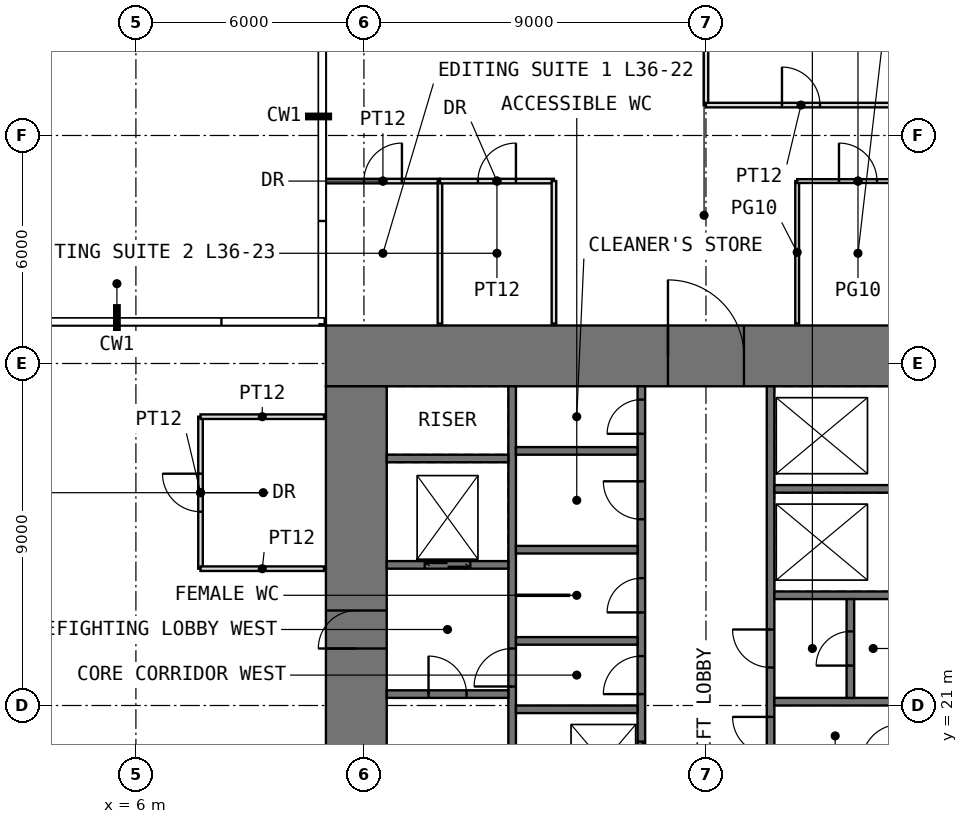
"""IFC4 building model, lengths in metres.
Left out: names, types, materials, properties, quantities, classifications, styles, units other than length and angle.
Written with IfcOpenShell. Run it as: python <this file> out.ifc"""

import sys

from ifc_helpers import new_model, si_unit, direction, frame, frame_2d, origin, place, context, subcontext, project, spatial, rectangle, extrude, element, fill, save


model = new_model("IFC4")
c1 = context("Model", 3, precision=1e-05, world=origin(), true_north=direction((0.0, 1.0)))
c2 = subcontext(c1, "Body", "Model", "MODEL_VIEW")
j1 = project(units=[si_unit("LENGTHUNIT", "METRE"), si_unit("PLANEANGLEUNIT", "RADIAN")], contexts=[c1])
p1 = place(None, origin())
s1 = spatial("IfcSite", under=j1, at=p1, CompositionType="ELEMENT")
p2 = place(p1, origin())
s2 = spatial("IfcBuilding", under=s1, at=p2, CompositionType="ELEMENT")
p3 = place(p2, frame((0.0, 0.0, 152.5)))
s3 = spatial("IfcBuildingStorey", under=s2, at=p3, CompositionType="ELEMENT", Elevation=152.5)
p4 = place(p3, frame((11.0, 30.2, -0.05), z_axis=(0.0, 0.0, 1.0), x_axis=(1.0, 0.0, 0.0)))
e1 = element("IfcWall", 1, at=p4, inside=s3, PredefinedType="SHEAR", context=c2, shape_type="SweptSolid", body=[
    extrude(rectangle(XDim=20.0, YDim=1.6, at=frame_2d((10.0, 0.0))), origin(), (0.0, 0.0, 1.0), 4.0),
])
p5 = place(p4, frame((9.0, 0.0, 0.05)))
e2 = element("IfcOpeningElement", 2, at=p5, cuts=e1, PredefinedType="OPENING", context=c2, shape_type="SweptSolid", body=[
    extrude(rectangle(XDim=2.0, YDim=2.2, at=frame_2d((1.0, 1.1))), frame((0.0, 0.81, 0.0), z_axis=(0.0, -1.0, 0.0), x_axis=(1.0, 0.0, 0.0)), (0.0, 0.0, 1.0), 1.62),
])
p6 = place(p3, frame((11.8, 12.6, -0.05), z_axis=(0.0, 0.0, 1.0), x_axis=(0.0, 1.0, 0.0)))
e3 = element("IfcWall", 3, at=p6, inside=s3, PredefinedType="SHEAR", context=c2, shape_type="SweptSolid", body=[
    extrude(rectangle(XDim=16.8, YDim=1.6, at=frame_2d((8.4, 0.0))), origin(), (0.0, 0.0, 1.0), 4.0),
])
p7 = place(p6, frame((9.9, 0.0, 0.05)))
e4 = element("IfcOpeningElement", 4, at=p7, cuts=e3, PredefinedType="OPENING", context=c2, shape_type="SweptSolid", body=[
    extrude(rectangle(XDim=1.0, YDim=2.2, at=frame_2d((0.5, 1.1))), frame((0.0, 0.81, 0.0), z_axis=(0.0, -1.0, 0.0), x_axis=(1.0, 0.0, 0.0)), (0.0, 0.0, 1.0), 1.62),
])
p8 = place(p3, frame((15.9, 12.6, -0.05), z_axis=(0.0, 0.0, 1.0), x_axis=(0.0, 1.0, 0.0)))
e5 = element("IfcWall", 5, at=p8, inside=s3, PredefinedType="SHEAR", context=c2, shape_type="SweptSolid", body=[
    extrude(rectangle(XDim=16.8, YDim=0.2, at=frame_2d((8.4, 0.0))), origin(), (0.0, 0.0, 1.0), 4.0),
])
p9 = place(p8, frame((8.9, 0.0, 0.05)))
e6 = element("IfcOpeningElement", 6, at=p9, cuts=e5, PredefinedType="OPENING", context=c2, shape_type="SweptSolid", body=[
    extrude(rectangle(XDim=1.0, YDim=2.2, at=frame_2d((0.5, 1.1))), frame((0.0, 0.11, 0.0), z_axis=(0.0, -1.0, 0.0), x_axis=(1.0, 0.0, 0.0)), (0.0, 0.0, 1.0), 0.22),
])
p10 = place(p3, frame((19.3, 12.6, -0.05), z_axis=(0.0, 0.0, 1.0), x_axis=(0.0, 1.0, 0.0)))
e7 = element("IfcWall", 7, at=p10, inside=s3, PredefinedType="SHEAR", context=c2, shape_type="SweptSolid", body=[
    extrude(rectangle(XDim=16.8, YDim=0.2, at=frame_2d((8.4, 0.0))), origin(), (0.0, 0.0, 1.0), 4.0),
])
p11 = place(p10, frame((8.7, 0.0, 0.05)))
e8 = element("IfcOpeningElement", 8, at=p11, cuts=e7, PredefinedType="OPENING", context=c2, shape_type="SweptSolid", body=[
    extrude(rectangle(XDim=1.0, YDim=2.2, at=frame_2d((0.5, 1.1))), frame((0.0, 0.11, 0.0), z_axis=(0.0, -1.0, 0.0), x_axis=(1.0, 0.0, 0.0)), (0.0, 0.0, 1.0), 0.22),
])
p12 = place(p10, frame((10.85, 0.0, 0.05)))
e9 = element("IfcOpeningElement", 9, at=p12, cuts=e7, PredefinedType="OPENING", context=c2, shape_type="SweptSolid", body=[
    extrude(rectangle(XDim=0.9, YDim=2.2, at=frame_2d((0.45, 1.1))), frame((0.0, 0.11, 0.0), z_axis=(0.0, -1.0, 0.0), x_axis=(1.0, 0.0, 0.0)), (0.0, 0.0, 1.0), 0.22),
])
p13 = place(p10, frame((13.3, 0.0, 0.05)))
e10 = element("IfcOpeningElement", 10, at=p13, cuts=e7, PredefinedType="OPENING", context=c2, shape_type="SweptSolid", body=[
    extrude(rectangle(XDim=1.0, YDim=2.2, at=frame_2d((0.5, 1.1))), frame((0.0, 0.11, 0.0), z_axis=(0.0, -1.0, 0.0), x_axis=(1.0, 0.0, 0.0)), (0.0, 0.0, 1.0), 0.22),
])
p14 = place(p10, frame((15.55, 0.0, 0.05)))
e11 = element("IfcOpeningElement", 11, at=p14, cuts=e7, PredefinedType="OPENING", context=c2, shape_type="SweptSolid", body=[
    extrude(rectangle(XDim=0.9, YDim=2.2, at=frame_2d((0.45, 1.1))), frame((0.0, 0.11, 0.0), z_axis=(0.0, -1.0, 0.0), x_axis=(1.0, 0.0, 0.0)), (0.0, 0.0, 1.0), 0.22),
])
p15 = place(p10, frame((0.75, 0.0, 0.05)))
e12 = element("IfcOpeningElement", 12, at=p15, cuts=e7, PredefinedType="OPENING", context=c2, shape_type="SweptSolid", body=[
    extrude(rectangle(XDim=1.1, YDim=2.2, at=frame_2d((0.55, 1.1))), frame((0.0, 0.11, 0.0), z_axis=(0.0, -1.0, 0.0), x_axis=(1.0, 0.0, 0.0)), (0.0, 0.0, 1.0), 0.22),
])
p16 = place(p10, frame((3.55, 0.0, 0.05)))
e13 = element("IfcOpeningElement", 13, at=p16, cuts=e7, PredefinedType="OPENING", context=c2, shape_type="SweptSolid", body=[
    extrude(rectangle(XDim=1.1, YDim=2.2, at=frame_2d((0.55, 1.1))), frame((0.0, 0.11, 0.0), z_axis=(0.0, -1.0, 0.0), x_axis=(1.0, 0.0, 0.0)), (0.0, 0.0, 1.0), 0.22),
])
p17 = place(p10, frame((6.35, 0.0, 0.05)))
e14 = element("IfcOpeningElement", 14, at=p17, cuts=e7, PredefinedType="OPENING", context=c2, shape_type="SweptSolid", body=[
    extrude(rectangle(XDim=1.1, YDim=2.2, at=frame_2d((0.55, 1.1))), frame((0.0, 0.11, 0.0), z_axis=(0.0, -1.0, 0.0), x_axis=(1.0, 0.0, 0.0)), (0.0, 0.0, 1.0), 0.22),
])
p18 = place(p3, frame((22.7, 12.6, -0.05), z_axis=(0.0, 0.0, 1.0), x_axis=(0.0, 1.0, 0.0)))
e15 = element("IfcWall", 15, at=p18, inside=s3, PredefinedType="SHEAR", context=c2, shape_type="SweptSolid", body=[
    extrude(rectangle(XDim=16.8, YDim=0.2, at=frame_2d((8.4, 0.0))), origin(), (0.0, 0.0, 1.0), 4.0),
])
p19 = place(p18, frame((7.1, 0.0, 0.05)))
e16 = element("IfcOpeningElement", 16, at=p19, cuts=e15, PredefinedType="OPENING", context=c2, shape_type="SweptSolid", body=[
    extrude(rectangle(XDim=1.0, YDim=2.2, at=frame_2d((0.5, 1.1))), frame((0.0, 0.11, 0.0), z_axis=(0.0, -1.0, 0.0), x_axis=(1.0, 0.0, 0.0)), (0.0, 0.0, 1.0), 0.22),
])
p20 = place(p18, frame((1.55, 0.0, 0.05)))
e17 = element("IfcOpeningElement", 17, at=p20, cuts=e15, PredefinedType="OPENING", context=c2, shape_type="SweptSolid", body=[
    extrude(rectangle(XDim=0.9, YDim=2.2, at=frame_2d((0.45, 1.1))), frame((0.0, 0.11, 0.0), z_axis=(0.0, -1.0, 0.0), x_axis=(1.0, 0.0, 0.0)), (0.0, 0.0, 1.0), 0.22),
])
p21 = place(p18, frame((4.95, 0.0, 0.05)))
e18 = element("IfcOpeningElement", 18, at=p21, cuts=e15, PredefinedType="OPENING", context=c2, shape_type="SweptSolid", body=[
    extrude(rectangle(XDim=0.9, YDim=2.2, at=frame_2d((0.45, 1.1))), frame((0.0, 0.11, 0.0), z_axis=(0.0, -1.0, 0.0), x_axis=(1.0, 0.0, 0.0)), (0.0, 0.0, 1.0), 0.22),
])
p22 = place(p18, frame((9.4, 0.0, 0.05)))
e19 = element("IfcOpeningElement", 19, at=p22, cuts=e15, PredefinedType="OPENING", context=c2, shape_type="SweptSolid", body=[
    extrude(rectangle(XDim=1.0, YDim=2.2, at=frame_2d((0.5, 1.1))), frame((0.0, 0.11, 0.0), z_axis=(0.0, -1.0, 0.0), x_axis=(1.0, 0.0, 0.0)), (0.0, 0.0, 1.0), 0.22),
])
p23 = place(p3, frame((12.6, 21.3, -0.05), z_axis=(0.0, 0.0, 1.0), x_axis=(1.0, 0.0, 0.0)))
e20 = element("IfcWall", 20, at=p23, inside=s3, PredefinedType="SHEAR", context=c2, shape_type="SweptSolid", body=[
    extrude(rectangle(XDim=3.2, YDim=0.2, at=frame_2d((1.6, 0.0))), origin(), (0.0, 0.0, 1.0), 4.0),
])
p24 = place(p23, frame((1.1, 0.0, 0.05)))
e21 = element("IfcOpeningElement", 21, at=p24, cuts=e20, PredefinedType="OPENING", context=c2, shape_type="SweptSolid", body=[
    extrude(rectangle(XDim=1.0, YDim=2.2, at=frame_2d((0.5, 1.1))), frame((0.0, 0.11, 0.0), z_axis=(0.0, -1.0, 0.0), x_axis=(1.0, 0.0, 0.0)), (0.0, 0.0, 1.0), 0.22),
])
p25 = place(p3, frame((12.6, 24.7, -0.05), z_axis=(0.0, 0.0, 1.0), x_axis=(1.0, 0.0, 0.0)))
e22 = element("IfcWall", 22, at=p25, inside=s3, PredefinedType="SHEAR", context=c2, shape_type="SweptSolid", body=[
    extrude(rectangle(XDim=3.2, YDim=0.2, at=frame_2d((1.6, 0.0))), origin(), (0.0, 0.0, 1.0), 4.0),
])
p26 = place(p25, frame((1.0, 0.0, 0.05)))
e23 = element("IfcOpeningElement", 23, at=p26, cuts=e22, PredefinedType="OPENING", context=c2, shape_type="SweptSolid", body=[
    extrude(rectangle(XDim=1.2, YDim=2.2, at=frame_2d((0.6, 1.1))), frame((0.0, 0.11, 0.0), z_axis=(0.0, -1.0, 0.0), x_axis=(1.0, 0.0, 0.0)), (0.0, 0.0, 1.0), 0.22),
])
for number, where, z_axis, x_axis in (
    (24, (12.6, 27.5, -0.05), (0.0, 0.0, 1.0), (1.0, 0.0, 0.0)),
    (25, (16.0, 20.9, -0.05), (0.0, 0.0, 1.0), (1.0, 0.0, 0.0)),
    (26, (16.0, 22.7, -0.05), (0.0, 0.0, 1.0), (1.0, 0.0, 0.0)),
    (27, (16.0, 25.1, -0.05), (0.0, 0.0, 1.0), (1.0, 0.0, 0.0)),
    (28, (16.0, 27.7, -0.05), (0.0, 0.0, 1.0), (1.0, 0.0, 0.0)),
    (29, (22.8, 21.1, -0.05), (0.0, 0.0, 1.0), (1.0, 0.0, 0.0)),
    (30, (22.8, 23.9, -0.05), (0.0, 0.0, 1.0), (1.0, 0.0, 0.0)),
    (31, (22.8, 26.7, -0.05), (0.0, 0.0, 1.0), (1.0, 0.0, 0.0)),
):
    element("IfcWall", number, at=place(p3, frame(where, z_axis=z_axis, x_axis=x_axis)), inside=s3, PredefinedType="SHEAR", context=c2, shape_type="SweptSolid", body=[
        extrude(rectangle(XDim=3.2, YDim=0.2, at=frame_2d((1.6, 0.0))), origin(), (0.0, 0.0, 1.0), 4.0),
    ])
p27 = place(p3, frame((16.0, 23.9, 0.0), z_axis=(0.0, 0.0, 1.0), x_axis=(1.0, 0.0, 0.0)))
e32 = element("IfcWall", 32, at=p27, inside=s3, PredefinedType="PARTITIONING", context=c2, shape_type="SweptSolid", body=[
    extrude(rectangle(XDim=1.4, YDim=0.03, at=frame_2d((0.7, 0.0))), origin(), (0.0, 0.0, 1.0), 3.75),
])
p28 = place(p3, frame((24.8, 21.2, -0.05), z_axis=(0.0, 0.0, 1.0), x_axis=(0.0, 1.0, 0.0)))
e33 = element("IfcWall", 33, at=p28, inside=s3, PredefinedType="SHEAR", context=c2, shape_type="SweptSolid", body=[
    extrude(rectangle(XDim=2.6, YDim=0.2, at=frame_2d((1.3, 0.0))), origin(), (0.0, 0.0, 1.0), 4.0),
])
p29 = place(p28, frame((0.85, 0.0, 0.05)))
e34 = element("IfcOpeningElement", 34, at=p29, cuts=e33, PredefinedType="OPENING", context=c2, shape_type="SweptSolid", body=[
    extrude(rectangle(XDim=0.9, YDim=2.2, at=frame_2d((0.45, 1.1))), frame((0.0, 0.11, 0.0), z_axis=(0.0, -1.0, 0.0), x_axis=(1.0, 0.0, 0.0)), (0.0, 0.0, 1.0), 0.22),
])
p30 = place(p3, frame((7.7, 24.6, 0.0), z_axis=(0.0, 0.0, 1.0), x_axis=(0.0, 1.0, 0.0)))
e35 = element("IfcWall", 35, at=p30, inside=s3, PredefinedType="PARTITIONING", context=c2, shape_type="SweptSolid", body=[
    extrude(rectangle(XDim=4.0, YDim=0.12, at=frame_2d((2.0, 0.0))), origin(), (0.0, 0.0, 1.0), 3.75),
])
p31 = place(p30, frame((1.5, 0.0, 0.0)))
e36 = element("IfcOpeningElement", 36, at=p31, cuts=e35, PredefinedType="OPENING", context=c2, shape_type="SweptSolid", body=[
    extrude(rectangle(XDim=1.0, YDim=2.2, at=frame_2d((0.5, 1.1))), frame((0.0, 0.07, 0.0), z_axis=(0.0, -1.0, 0.0), x_axis=(1.0, 0.0, 0.0)), (0.0, 0.0, 1.0), 0.14),
])
for number, where, z_axis, x_axis in (
    (37, (7.7, 24.6, 0.0), (0.0, 0.0, 1.0), (1.0, 0.0, 0.0)),
    (38, (7.7, 28.6, 0.0), (0.0, 0.0, 1.0), (1.0, 0.0, 0.0)),
):
    element("IfcWall", number, at=place(p3, frame(where, z_axis=z_axis, x_axis=x_axis)), inside=s3, PredefinedType="PARTITIONING", context=c2, shape_type="SweptSolid", body=[
        extrude(rectangle(XDim=3.25, YDim=0.12, at=frame_2d((1.625, 0.0))), origin(), (0.0, 0.0, 1.0), 3.75),
    ])
p32 = place(p3, frame((11.0, 34.8, 0.0), z_axis=(0.0, 0.0, 1.0), x_axis=(1.0, 0.0, 0.0)))
e39 = element("IfcWall", 39, at=p32, inside=s3, PredefinedType="PARTITIONING", context=c2, shape_type="SweptSolid", body=[
    extrude(rectangle(XDim=3.0, YDim=0.12, at=frame_2d((1.5, 0.0))), origin(), (0.0, 0.0, 1.0), 3.75),
])
p33 = place(p32, frame((1.0, 0.0, 0.0)))
e40 = element("IfcOpeningElement", 40, at=p33, cuts=e39, PredefinedType="OPENING", context=c2, shape_type="SweptSolid", body=[
    extrude(rectangle(XDim=1.0, YDim=2.2, at=frame_2d((0.5, 1.1))), frame((0.0, 0.07, 0.0), z_axis=(0.0, -1.0, 0.0), x_axis=(1.0, 0.0, 0.0)), (0.0, 0.0, 1.0), 0.14),
])
p34 = place(p3, frame((14.0, 31.05, 0.0), z_axis=(0.0, 0.0, 1.0), x_axis=(0.0, 1.0, 0.0)))
e41 = element("IfcWall", 41, at=p34, inside=s3, PredefinedType="PARTITIONING", context=c2, shape_type="SweptSolid", body=[
    extrude(rectangle(XDim=3.75, YDim=0.12, at=frame_2d((1.875, 0.0))), origin(), (0.0, 0.0, 1.0), 3.75),
])
p35 = place(p3, frame((14.0, 34.8, 0.0), z_axis=(0.0, 0.0, 1.0), x_axis=(1.0, 0.0, 0.0)))
e42 = element("IfcWall", 42, at=p35, inside=s3, PredefinedType="PARTITIONING", context=c2, shape_type="SweptSolid", body=[
    extrude(rectangle(XDim=3.0, YDim=0.12, at=frame_2d((1.5, 0.0))), origin(), (0.0, 0.0, 1.0), 3.75),
])
p36 = place(p35, frame((1.0, 0.0, 0.0)))
e43 = element("IfcOpeningElement", 43, at=p36, cuts=e42, PredefinedType="OPENING", context=c2, shape_type="SweptSolid", body=[
    extrude(rectangle(XDim=1.0, YDim=2.2, at=frame_2d((0.5, 1.1))), frame((0.0, 0.07, 0.0), z_axis=(0.0, -1.0, 0.0), x_axis=(1.0, 0.0, 0.0)), (0.0, 0.0, 1.0), 0.14),
])
p37 = place(p3, frame((17.0, 31.05, 0.0), z_axis=(0.0, 0.0, 1.0), x_axis=(0.0, 1.0, 0.0)))
e44 = element("IfcWall", 44, at=p37, inside=s3, PredefinedType="PARTITIONING", context=c2, shape_type="SweptSolid", body=[
    extrude(rectangle(XDim=3.75, YDim=0.12, at=frame_2d((1.875, 0.0))), origin(), (0.0, 0.0, 1.0), 3.75),
])
p38 = place(p3, frame((21.0, 36.8, 0.0), z_axis=(0.0, 0.0, 1.0), x_axis=(0.0, 1.0, 0.0)))
e45 = element("IfcWall", 45, at=p38, inside=s3, PredefinedType="PARTITIONING", context=c2, shape_type="SweptSolid", body=[
    extrude(rectangle(XDim=1.94, YDim=0.12, at=frame_2d((0.97, 0.0))), origin(), (0.0, 0.0, 1.0), 3.75),
])
p39 = place(p3, frame((21.0, 36.8, 0.0), z_axis=(0.0, 0.0, 1.0), x_axis=(1.0, 0.0, 0.0)))
e46 = element("IfcWall", 46, at=p39, inside=s3, PredefinedType="PARTITIONING", context=c2, shape_type="SweptSolid", body=[
    extrude(rectangle(XDim=5.0, YDim=0.12, at=frame_2d((2.5, 0.0))), origin(), (0.0, 0.0, 1.0), 3.75),
])
p40 = place(p39, frame((2.0, 0.0, 0.0)))
e47 = element("IfcOpeningElement", 47, at=p40, cuts=e46, PredefinedType="OPENING", context=c2, shape_type="SweptSolid", body=[
    extrude(rectangle(XDim=1.0, YDim=2.2, at=frame_2d((0.5, 1.1))), frame((0.0, 0.07, 0.0), z_axis=(0.0, -1.0, 0.0), x_axis=(1.0, 0.0, 0.0)), (0.0, 0.0, 1.0), 0.14),
])
p41 = place(p3, frame((23.4, 31.05, 0.0), z_axis=(0.0, 0.0, 1.0), x_axis=(0.0, 1.0, 0.0)))
e48 = element("IfcWall", 48, at=p41, inside=s3, PredefinedType="PARTITIONING", context=c2, shape_type="SweptSolid", body=[
    extrude(rectangle(XDim=3.75, YDim=0.1, at=frame_2d((1.875, 0.0))), origin(), (0.0, 0.0, 1.0), 3.75),
])
p42 = place(p3, frame((23.4, 34.8, 0.0), z_axis=(0.0, 0.0, 1.0), x_axis=(1.0, 0.0, 0.0)))
e49 = element("IfcWall", 49, at=p42, inside=s3, PredefinedType="PARTITIONING", context=c2, shape_type="SweptSolid", body=[
    extrude(rectangle(XDim=3.2, YDim=0.1, at=frame_2d((1.6, 0.0))), origin(), (0.0, 0.0, 1.0), 3.75),
])
p43 = place(p42, frame((1.1, 0.0, 0.0)))
e50 = element("IfcOpeningElement", 50, at=p43, cuts=e49, PredefinedType="OPENING", context=c2, shape_type="SweptSolid", body=[
    extrude(rectangle(XDim=1.0, YDim=2.4, at=frame_2d((0.5, 1.2))), frame((0.0, 0.06, 0.0), z_axis=(0.0, -1.0, 0.0), x_axis=(1.0, 0.0, 0.0)), (0.0, 0.0, 1.0), 0.12),
])
p44 = place(p5, origin())
e51 = element("IfcDoor", 51, at=p44, inside=s3, OperationType="DOUBLE_DOOR_SINGLE_SWING", PredefinedType="DOOR", context=c2, shape_type="SweptSolid", body=[
    extrude(rectangle(XDim=2.0, YDim=2.2, at=frame_2d((1.0, 1.1))), frame((0.0, 0.025, 0.0), z_axis=(0.0, -1.0, 0.0), x_axis=(1.0, 0.0, 0.0)), (0.0, 0.0, 1.0), 0.05),
])
fill(e2, e51)
p45 = place(p7, origin())
e52 = element("IfcDoor", 52, at=p45, inside=s3, OperationType="SINGLE_SWING_LEFT", PredefinedType="DOOR", context=c2, shape_type="SweptSolid", body=[
    extrude(rectangle(XDim=1.0, YDim=2.2, at=frame_2d((0.5, 1.1))), frame((0.0, 0.025, 0.0), z_axis=(0.0, -1.0, 0.0), x_axis=(1.0, 0.0, 0.0)), (0.0, 0.0, 1.0), 0.05),
])
fill(e4, e52)
p46 = place(p24, origin())
e53 = element("IfcDoor", 53, at=p46, inside=s3, OperationType="SINGLE_SWING_LEFT", PredefinedType="DOOR", context=c2, shape_type="SweptSolid", body=[
    extrude(rectangle(XDim=1.0, YDim=2.2, at=frame_2d((0.5, 1.1))), frame((0.0, 0.025, 0.0), z_axis=(0.0, -1.0, 0.0), x_axis=(1.0, 0.0, 0.0)), (0.0, 0.0, 1.0), 0.05),
])
fill(e21, e53)
p47 = place(p9, origin())
e54 = element("IfcDoor", 54, at=p47, inside=s3, OperationType="SINGLE_SWING_LEFT", PredefinedType="DOOR", context=c2, shape_type="SweptSolid", body=[
    extrude(rectangle(XDim=1.0, YDim=2.2, at=frame_2d((0.5, 1.1))), frame((0.0, 0.025, 0.0), z_axis=(0.0, -1.0, 0.0), x_axis=(1.0, 0.0, 0.0)), (0.0, 0.0, 1.0), 0.05),
])
fill(e6, e54)
p48 = place(p11, origin())
e55 = element("IfcDoor", 55, at=p48, inside=s3, OperationType="SINGLE_SWING_LEFT", PredefinedType="DOOR", context=c2, shape_type="SweptSolid", body=[
    extrude(rectangle(XDim=1.0, YDim=2.2, at=frame_2d((0.5, 1.1))), frame((0.0, 0.025, 0.0), z_axis=(0.0, -1.0, 0.0), x_axis=(1.0, 0.0, 0.0)), (0.0, 0.0, 1.0), 0.05),
])
fill(e8, e55)
p49 = place(p19, origin())
e56 = element("IfcDoor", 56, at=p49, inside=s3, OperationType="SINGLE_SWING_RIGHT", PredefinedType="DOOR", context=c2, shape_type="SweptSolid", body=[
    extrude(rectangle(XDim=1.0, YDim=2.2, at=frame_2d((0.5, 1.1))), frame((0.0, 0.025, 0.0), z_axis=(0.0, -1.0, 0.0), x_axis=(1.0, 0.0, 0.0)), (0.0, 0.0, 1.0), 0.05),
])
fill(e16, e56)
p50 = place(p12, origin())
e57 = element("IfcDoor", 57, at=p50, inside=s3, OperationType="SINGLE_SWING_LEFT", PredefinedType="DOOR", context=c2, shape_type="SweptSolid", body=[
    extrude(rectangle(XDim=0.9, YDim=2.2, at=frame_2d((0.45, 1.1))), frame((0.0, 0.025, 0.0), z_axis=(0.0, -1.0, 0.0), x_axis=(1.0, 0.0, 0.0)), (0.0, 0.0, 1.0), 0.05),
])
fill(e9, e57)
p51 = place(p13, origin())
e58 = element("IfcDoor", 58, at=p51, inside=s3, OperationType="SINGLE_SWING_RIGHT", PredefinedType="DOOR", context=c2, shape_type="SweptSolid", body=[
    extrude(rectangle(XDim=1.0, YDim=2.2, at=frame_2d((0.5, 1.1))), frame((0.0, 0.025, 0.0), z_axis=(0.0, -1.0, 0.0), x_axis=(1.0, 0.0, 0.0)), (0.0, 0.0, 1.0), 0.05),
])
fill(e10, e58)
p52 = place(p14, origin())
e59 = element("IfcDoor", 59, at=p52, inside=s3, OperationType="SINGLE_SWING_LEFT", PredefinedType="DOOR", context=c2, shape_type="SweptSolid", body=[
    extrude(rectangle(XDim=0.9, YDim=2.2, at=frame_2d((0.45, 1.1))), frame((0.0, 0.025, 0.0), z_axis=(0.0, -1.0, 0.0), x_axis=(1.0, 0.0, 0.0)), (0.0, 0.0, 1.0), 0.05),
])
fill(e11, e59)
p53 = place(p22, origin())
e60 = element("IfcDoor", 60, at=p53, inside=s3, OperationType="SINGLE_SWING_RIGHT", PredefinedType="DOOR", context=c2, shape_type="SweptSolid", body=[
    extrude(rectangle(XDim=1.0, YDim=2.2, at=frame_2d((0.5, 1.1))), frame((0.0, 0.025, 0.0), z_axis=(0.0, -1.0, 0.0), x_axis=(1.0, 0.0, 0.0)), (0.0, 0.0, 1.0), 0.05),
])
fill(e19, e60)
p54 = place(p29, origin())
e61 = element("IfcDoor", 61, at=p54, inside=s3, OperationType="SINGLE_SWING_LEFT", PredefinedType="DOOR", context=c2, shape_type="SweptSolid", body=[
    extrude(rectangle(XDim=0.9, YDim=2.2, at=frame_2d((0.45, 1.1))), frame((0.0, 0.025, 0.0), z_axis=(0.0, -1.0, 0.0), x_axis=(1.0, 0.0, 0.0)), (0.0, 0.0, 1.0), 0.05),
])
fill(e34, e61)
p55 = place(p33, origin())
e62 = element("IfcDoor", 62, at=p55, inside=s3, OperationType="SINGLE_SWING_RIGHT", PredefinedType="DOOR", context=c2, shape_type="SweptSolid", body=[
    extrude(rectangle(XDim=1.0, YDim=2.2, at=frame_2d((0.5, 1.1))), frame((0.0, 0.025, 0.0), z_axis=(0.0, -1.0, 0.0), x_axis=(1.0, 0.0, 0.0)), (0.0, 0.0, 1.0), 0.05),
])
fill(e40, e62)
p56 = place(p36, origin())
e63 = element("IfcDoor", 63, at=p56, inside=s3, OperationType="SINGLE_SWING_RIGHT", PredefinedType="DOOR", context=c2, shape_type="SweptSolid", body=[
    extrude(rectangle(XDim=1.0, YDim=2.2, at=frame_2d((0.5, 1.1))), frame((0.0, 0.025, 0.0), z_axis=(0.0, -1.0, 0.0), x_axis=(1.0, 0.0, 0.0)), (0.0, 0.0, 1.0), 0.05),
])
fill(e43, e63)
p57 = place(p43, origin())
e64 = element("IfcDoor", 64, at=p57, inside=s3, OperationType="SINGLE_SWING_LEFT", PredefinedType="DOOR", context=c2, shape_type="SweptSolid", body=[
    extrude(rectangle(XDim=1.0, YDim=2.4, at=frame_2d((0.5, 1.2))), frame((0.0, 0.025, 0.0), z_axis=(0.0, -1.0, 0.0), x_axis=(1.0, 0.0, 0.0)), (0.0, 0.0, 1.0), 0.05),
])
fill(e50, e64)
p58 = place(p40, origin())
e65 = element("IfcDoor", 65, at=p58, inside=s3, OperationType="SINGLE_SWING_LEFT", PredefinedType="DOOR", context=c2, shape_type="SweptSolid", body=[
    extrude(rectangle(XDim=1.0, YDim=2.2, at=frame_2d((0.5, 1.1))), frame((0.0, 0.025, 0.0), z_axis=(0.0, -1.0, 0.0), x_axis=(1.0, 0.0, 0.0)), (0.0, 0.0, 1.0), 0.05),
])
fill(e47, e65)
p59 = place(p31, origin())
e66 = element("IfcDoor", 66, at=p59, inside=s3, OperationType="SINGLE_SWING_RIGHT", PredefinedType="DOOR", context=c2, shape_type="SweptSolid", body=[
    extrude(rectangle(XDim=1.0, YDim=2.2, at=frame_2d((0.5, 1.1))), frame((0.0, 0.025, 0.0), z_axis=(0.0, -1.0, 0.0), x_axis=(1.0, 0.0, 0.0)), (0.0, 0.0, 1.0), 0.05),
])
fill(e36, e66)
p60 = place(p17, origin())
e67 = element("IfcDoor", 67, at=p60, inside=s3, OperationType="DOUBLE_DOOR_SLIDING", PredefinedType="DOOR", context=c2, shape_type="SweptSolid", body=[
    extrude(rectangle(XDim=1.1, YDim=2.2, at=frame_2d((0.55, 1.1))), frame((0.0, 0.025, 0.0), z_axis=(0.0, -1.0, 0.0), x_axis=(1.0, 0.0, 0.0)), (0.0, 0.0, 1.0), 0.05),
])
fill(e14, e67)
p61 = place(p26, origin())
e68 = element("IfcDoor", 68, at=p61, inside=s3, OperationType="DOUBLE_DOOR_SLIDING", PredefinedType="DOOR", context=c2, shape_type="SweptSolid", body=[
    extrude(rectangle(XDim=1.2, YDim=2.2, at=frame_2d((0.6, 1.1))), frame((0.0, 0.025, 0.0), z_axis=(0.0, -1.0, 0.0), x_axis=(1.0, 0.0, 0.0)), (0.0, 0.0, 1.0), 0.05),
])
fill(e23, e68)
save(model, sys.argv[1])
